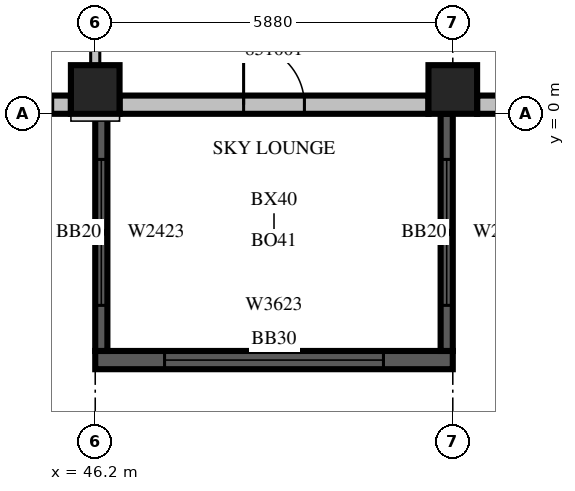
"""IFC4 building model, lengths in metres.
Left out: names, types, materials, properties, quantities, classifications, styles, units other than length and angle.
Written with IfcOpenShell. Run it as: python <this file> out.ifc"""

import sys

from ifc_helpers import new_model, si_unit, direction, frame, frame_2d, origin, origin_2d, place, context, subcontext, project, spatial, rectangle, extrude, source, transform, mapped, element, fill, save


model = new_model("IFC4")
c1 = context("Model", 3, precision=1e-05, world=origin(), true_north=direction((0.0, 1.0)))
c2 = subcontext(c1, "Body", "Model", "MODEL_VIEW")
j1 = project(units=[si_unit("LENGTHUNIT", "METRE"), si_unit("PLANEANGLEUNIT", "RADIAN")], contexts=[c1])
p1 = place(None, origin())
s1 = spatial("IfcSite", under=j1, at=p1, CompositionType="ELEMENT")
p2 = place(p1, origin())
s2 = spatial("IfcBuilding", under=s1, at=p2, CompositionType="ELEMENT")
p3 = place(p2, frame((0.0, 0.0, 227.2)))
s3 = spatial("IfcBuildingStorey", under=s2, at=p3, CompositionType="ELEMENT", Elevation=227.2)
m1 = source(origin(), c2, "Body", "SweptSolid", [
    extrude(rectangle(XDim=0.8, YDim=0.8, at=origin_2d()), origin(), (0.0, 0.0, 1.0), 3.8),
])
for number, where, z_axis, x_axis in (
    (1, (46.2, 0.4, 0.0), (0.0, 0.0, 1.0), (1.0, 0.0, 0.0)),
    (2, (52.08, 0.4, 0.0), (0.0, 0.0, 1.0), (1.0, 0.0, 0.0)),
):
    element("IfcColumn", number, at=place(p3, frame(where, z_axis=z_axis, x_axis=x_axis)), inside=s3, PredefinedType="COLUMN", context=c2, shape_type="MappedRepresentation", body=[
        mapped(m1, transform((0.0, 0.0, 0.0), scale=1.0)),
    ])
m2 = source(origin(), c2, "Body", "SweptSolid", [
    extrude(rectangle(XDim=5.88, YDim=0.3, at=frame_2d((2.94, 0.0))), origin(), (0.0, 0.0, 1.0), 3.4),
])
p4 = place(p3, frame((46.2, -4.05, 0.0), z_axis=(0.0, 0.0, 1.0), x_axis=(1.0, 0.0, 0.0)))
e3 = element("IfcWall", 3, at=p4, inside=s3, PredefinedType="SOLIDWALL", context=c2, shape_type="MappedRepresentation", body=[
    mapped(m2, transform((0.0, 0.0, 0.0), scale=1.0)),
])
m3 = source(origin(), c2, "Body", "SweptSolid", [
    extrude(rectangle(XDim=3.6, YDim=2.3, at=frame_2d((1.8, 1.15))), frame((0.0, 0.16, 0.0), z_axis=(0.0, -1.0, 0.0), x_axis=(1.0, 0.0, 0.0)), (0.0, 0.0, 1.0), 0.32),
])
p5 = place(p4, frame((1.14, 0.0, 0.6)))
e4 = element("IfcOpeningElement", 4, at=p5, cuts=e3, PredefinedType="OPENING", context=c2, shape_type="MappedRepresentation", body=[
    mapped(m3, transform((0.0, 0.0, 0.0), scale=1.0)),
])
m4 = source(origin(), c2, "Body", "SweptSolid", [
    extrude(rectangle(XDim=3.9, YDim=0.2, at=frame_2d((1.95, 0.0))), origin(), (0.0, 0.0, 1.0), 3.4),
])
p6 = place(p3, frame((46.3, 0.0, 0.0), z_axis=(0.0, 0.0, 1.0), x_axis=(0.0, -1.0, 0.0)))
e5 = element("IfcWall", 5, at=p6, inside=s3, PredefinedType="SOLIDWALL", context=c2, shape_type="MappedRepresentation", body=[
    mapped(m4, transform((0.0, 0.0, 0.0), scale=1.0)),
])
m5 = source(origin(), c2, "Body", "SweptSolid", [
    extrude(rectangle(XDim=2.4, YDim=2.3, at=frame_2d((1.2, 1.15))), frame((0.0, 0.11, 0.0), z_axis=(0.0, -1.0, 0.0), x_axis=(1.0, 0.0, 0.0)), (0.0, 0.0, 1.0), 0.22),
])
p7 = place(p6, frame((0.75, 0.0, 0.6)))
e6 = element("IfcOpeningElement", 6, at=p7, cuts=e5, PredefinedType="OPENING", context=c2, shape_type="MappedRepresentation", body=[
    mapped(m5, transform((0.0, 0.0, 0.0), scale=1.0)),
])
p8 = place(p3, frame((51.98, 0.0, 0.0), z_axis=(0.0, 0.0, 1.0), x_axis=(0.0, -1.0, 0.0)))
e7 = element("IfcWall", 7, at=p8, inside=s3, PredefinedType="SOLIDWALL", context=c2, shape_type="MappedRepresentation", body=[
    mapped(m4, transform((0.0, 0.0, 0.0), scale=1.0)),
])
p9 = place(p8, frame((0.75, 0.0, 0.6)))
e8 = element("IfcOpeningElement", 8, at=p9, cuts=e7, PredefinedType="OPENING", context=c2, shape_type="MappedRepresentation", body=[
    mapped(m5, transform((0.0, 0.0, 0.0), scale=1.0)),
])
p10 = place(p3, frame((44.0, 0.15, 0.0), z_axis=(0.0, 0.0, 1.0), x_axis=(1.0, 0.0, 0.0)))
e9 = element("IfcWall", 9, at=p10, inside=s3, PredefinedType="STANDARD", context=c2, shape_type="SweptSolid", body=[
    extrude(rectangle(XDim=1.8, YDim=0.3, at=frame_2d((0.9, 0.0))), origin(), (0.0, 0.0, 1.0), 3.4),
])
m6 = source(origin(), c2, "Body", "SweptSolid", [
    extrude(rectangle(XDim=1.2, YDim=2.3, at=frame_2d((0.6, 1.15))), frame((0.0, 0.16, 0.0), z_axis=(0.0, -1.0, 0.0), x_axis=(1.0, 0.0, 0.0)), (0.0, 0.0, 1.0), 0.32),
])
p11 = place(p10, frame((0.3, 0.0, 0.6)))
e10 = element("IfcOpeningElement", 10, at=p11, cuts=e9, PredefinedType="OPENING", context=c2, shape_type="MappedRepresentation", body=[
    mapped(m6, transform((0.0, 0.0, 0.0), scale=1.0)),
])
p12 = place(p3, frame((46.6, 0.15, 0.0), z_axis=(0.0, 0.0, 1.0), x_axis=(1.0, 0.0, 0.0)))
e11 = element("IfcWall", 11, at=p12, inside=s3, PredefinedType="STANDARD", context=c2, shape_type="SweptSolid", body=[
    extrude(rectangle(XDim=5.08, YDim=0.3, at=frame_2d((2.54, 0.0))), origin(), (0.0, 0.0, 1.0), 3.4),
])
m7 = source(origin(), c2, "Body", "SweptSolid", [
    extrude(rectangle(XDim=1.0, YDim=2.1, at=frame_2d((0.5, 1.05))), frame((0.0, 0.16, 0.0), z_axis=(0.0, -1.0, 0.0), x_axis=(1.0, 0.0, 0.0)), (0.0, 0.0, 1.0), 0.32),
])
p13 = place(p12, frame((2.04, 0.0, 0.0)))
e12 = element("IfcOpeningElement", 12, at=p13, cuts=e11, PredefinedType="OPENING", context=c2, shape_type="MappedRepresentation", body=[
    mapped(m7, transform((0.0, 0.0, 0.0), scale=1.0)),
])
p14 = place(p3, frame((52.48, 0.15, 0.0), z_axis=(0.0, 0.0, 1.0), x_axis=(1.0, 0.0, 0.0)))
e13 = element("IfcWall", 13, at=p14, inside=s3, PredefinedType="STANDARD", context=c2, shape_type="SweptSolid", body=[
    extrude(rectangle(XDim=2.96, YDim=0.3, at=frame_2d((1.48, 0.0))), origin(), (0.0, 0.0, 1.0), 3.4),
])
m8 = source(origin(), c2, "Body", "SweptSolid", [
    extrude(rectangle(XDim=1.8, YDim=2.3, at=frame_2d((0.9, 1.15))), frame((0.0, 0.16, 0.0), z_axis=(0.0, -1.0, 0.0), x_axis=(1.0, 0.0, 0.0)), (0.0, 0.0, 1.0), 0.32),
])
p15 = place(p14, frame((0.38, 0.0, 0.6)))
e14 = element("IfcOpeningElement", 14, at=p15, cuts=e13, PredefinedType="OPENING", context=c2, shape_type="MappedRepresentation", body=[
    mapped(m8, transform((0.0, 0.0, 0.0), scale=1.0)),
])
m9 = source(origin(), c2, "Body", "SweptSolid", [
    extrude(rectangle(XDim=9.302, YDim=0.15, at=frame_2d((4.651, 0.0))), origin(), (0.0, 0.0, 1.0), 3.4),
])
p16 = place(p3, frame((46.2, 0.799, 0.0), z_axis=(0.0, 0.0, 1.0), x_axis=(0.0, 1.0, 0.0)))
e15 = element("IfcWall", 15, at=p16, inside=s3, PredefinedType="PARTITIONING", context=c2, shape_type="MappedRepresentation", body=[
    mapped(m9, transform((0.0, 0.0, 0.0), scale=1.0)),
])
m10 = source(origin(), c2, "Body", "SweptSolid", [
    extrude(rectangle(XDim=3.6, YDim=2.3, at=frame_2d((1.8, 1.15))), frame((0.0, 0.03, 0.0), z_axis=(0.0, -1.0, 0.0), x_axis=(1.0, 0.0, 0.0)), (0.0, 0.0, 1.0), 0.06),
])
p17 = place(p5, origin())
e16 = element("IfcWindow", 16, at=p17, inside=s3, PartitioningType="SINGLE_PANEL", PredefinedType="WINDOW", context=c2, shape_type="MappedRepresentation", body=[
    mapped(m10, transform((0.0, 0.0, 0.0), scale=1.0)),
])
fill(e4, e16)
m11 = source(origin(), c2, "Body", "SweptSolid", [
    extrude(rectangle(XDim=2.4, YDim=2.3, at=frame_2d((1.2, 1.15))), frame((0.0, 0.03, 0.0), z_axis=(0.0, -1.0, 0.0), x_axis=(1.0, 0.0, 0.0)), (0.0, 0.0, 1.0), 0.06),
])
p18 = place(p7, origin())
e17 = element("IfcWindow", 17, at=p18, inside=s3, PartitioningType="SINGLE_PANEL", PredefinedType="WINDOW", context=c2, shape_type="MappedRepresentation", body=[
    mapped(m11, transform((0.0, 0.0, 0.0), scale=1.0)),
])
fill(e6, e17)
p19 = place(p9, origin())
e18 = element("IfcWindow", 18, at=p19, inside=s3, PartitioningType="SINGLE_PANEL", PredefinedType="WINDOW", context=c2, shape_type="MappedRepresentation", body=[
    mapped(m11, transform((0.0, 0.0, 0.0), scale=1.0)),
])
fill(e8, e18)
m12 = source(origin(), c2, "Body", "SweptSolid", [
    extrude(rectangle(XDim=1.0, YDim=2.1, at=frame_2d((0.5, 1.05))), frame((0.0, 0.025, 0.0), z_axis=(0.0, -1.0, 0.0), x_axis=(1.0, 0.0, 0.0)), (0.0, 0.0, 1.0), 0.05),
])
p20 = place(p13, origin())
e19 = element("IfcDoor", 19, at=p20, inside=s3, OperationType="SINGLE_SWING_LEFT", PredefinedType="DOOR", context=c2, shape_type="MappedRepresentation", body=[
    mapped(m12, transform((0.0, 0.0, 0.0), scale=1.0)),
])
fill(e12, e19)
save(model, sys.argv[1])
